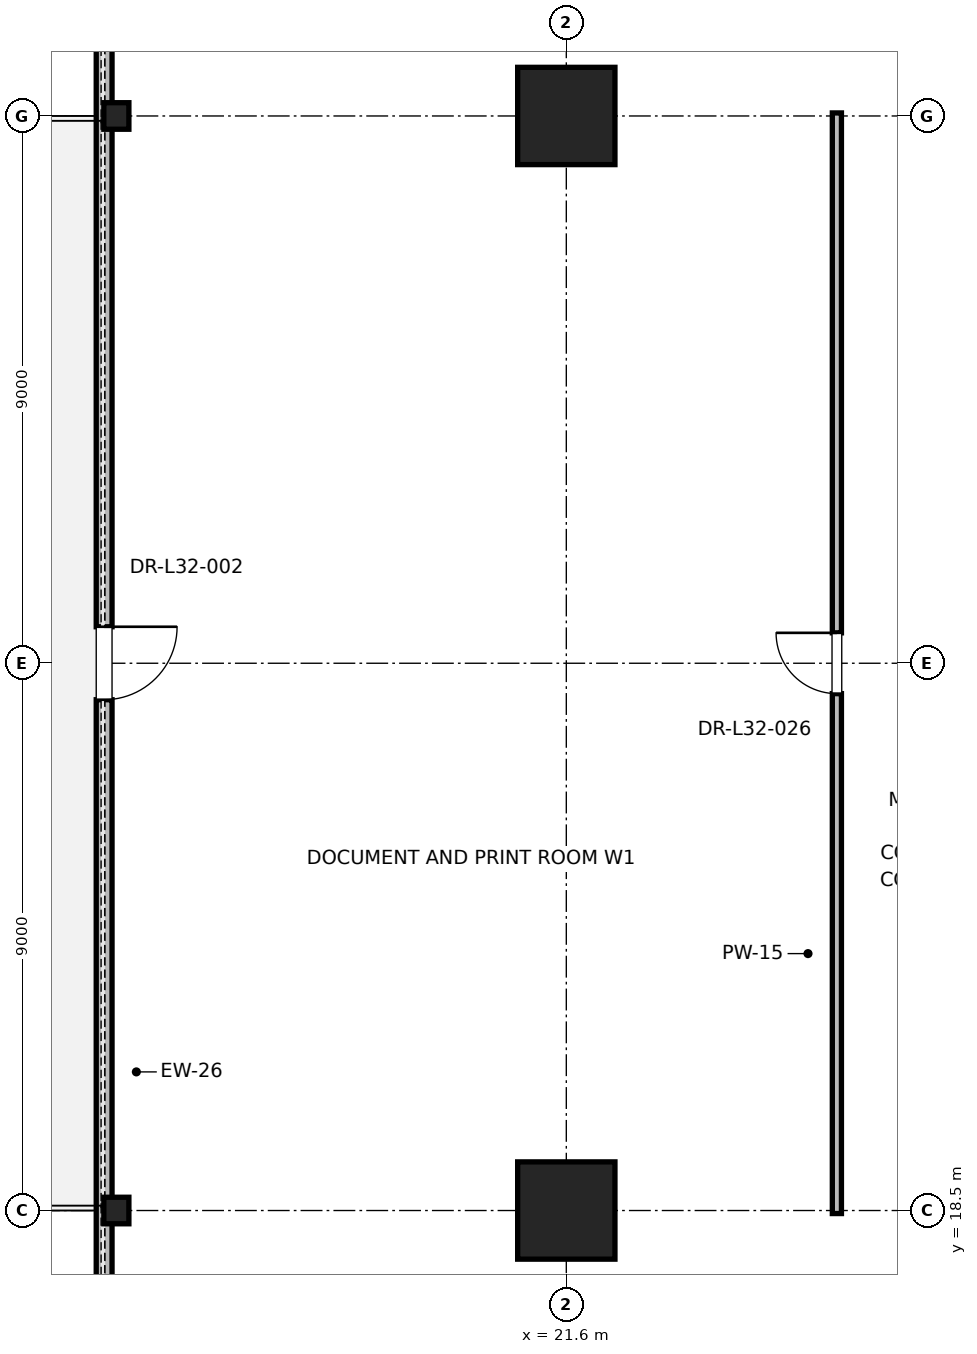
"""IFC4 building model, lengths in metres.
Left out: names, types, materials, properties, quantities, classifications, styles, units other than length and angle.
Written with IfcOpenShell. Run it as: python <this file> out.ifc"""

import sys

from ifc_helpers import new_model, si_unit, direction, frame, frame_2d, origin, origin_2d, place, context, subcontext, project, spatial, rectangle, i_section, extrude, element, fill, save


model = new_model("IFC4")
c1 = context("Model", 3, precision=1e-05, world=origin(), true_north=direction((0.0, 1.0)))
c2 = subcontext(c1, "Body", "Model", "MODEL_VIEW")
j1 = project(units=[si_unit("LENGTHUNIT", "METRE"), si_unit("PLANEANGLEUNIT", "RADIAN")], contexts=[c1])
p1 = place(None, origin())
s1 = spatial("IfcSite", under=j1, at=p1, CompositionType="ELEMENT")
p2 = place(p1, origin())
s2 = spatial("IfcBuilding", under=s1, at=p2, CompositionType="ELEMENT")
p3 = place(p2, frame((0.0, 0.0, 140.4)))
s3 = spatial("IfcBuildingStorey", under=s2, at=p3, CompositionType="ELEMENT", Elevation=140.4)
for number, where, z_axis, x_axis in (
    (1, (21.6, 18.5, 0.0), (0.0, 0.0, 1.0), (1.0, 0.0, 0.0)),
    (2, (21.6, 36.5, 0.0), (0.0, 0.0, 1.0), (1.0, 0.0, 0.0)),
):
    element("IfcColumn", number, at=place(p3, frame(where, z_axis=z_axis, x_axis=x_axis)), inside=s3, PredefinedType="COLUMN", context=c2, shape_type="SweptSolid", body=[
        extrude(rectangle(XDim=1.6, YDim=1.6, at=origin_2d()), origin(), (0.0, 0.0, 1.0), 4.0),
    ])
for number, where, z_axis, x_axis in (
    (3, (14.2, 18.5, 0.0), (0.0, 0.0, 1.0), (1.0, 0.0, 0.0)),
    (4, (14.2, 36.5, 0.0), (0.0, 0.0, 1.0), (1.0, 0.0, 0.0)),
):
    element("IfcColumn", number, at=place(p3, frame(where, z_axis=z_axis, x_axis=x_axis)), inside=s3, PredefinedType="COLUMN", context=c2, shape_type="SweptSolid", body=[
        extrude(i_section(OverallWidth=0.412, OverallDepth=0.437, WebThickness=0.036, FlangeThickness=0.058, FilletRadius=0.015, at=origin_2d()), origin(), (0.0, 0.0, 1.0), 4.0),
    ])
p4 = place(p3, frame((13.999, 46.541, 0.0), z_axis=(0.0, 0.0, 1.0), x_axis=(0.0, -1.0, 0.0)))
e5 = element("IfcWall", 5, at=p4, inside=s3, PredefinedType="PARAPET", context=c2, shape_type="SweptSolid", body=[
    extrude(rectangle(XDim=38.082, YDim=0.26, at=frame_2d((19.041, 0.0))), origin(), (0.0, 0.0, 1.0), 2.97),
])
p5 = place(p4, frame((4.2, 0.0, 0.85)))
e6 = element("IfcOpeningElement", 6, at=p5, cuts=e5, PredefinedType="OPENING", context=c2, shape_type="SweptSolid", body=[
    extrude(rectangle(XDim=2.0, YDim=2.3, at=frame_2d((1.0, 1.15))), frame((0.0, 0.13, 0.0), z_axis=(0.0, -1.0, 0.0), x_axis=(1.0, 0.0, 0.0)), (0.0, 0.0, 1.0), 0.26),
])
p6 = place(p4, frame((18.441, 0.0, 0.0)))
e7 = element("IfcOpeningElement", 7, at=p6, cuts=e5, PredefinedType="OPENING", context=c2, shape_type="SweptSolid", body=[
    extrude(rectangle(XDim=1.2, YDim=2.2, at=frame_2d((0.6, 1.1))), frame((0.0, 0.13, 0.0), z_axis=(0.0, -1.0, 0.0), x_axis=(1.0, 0.0, 0.0)), (0.0, 0.0, 1.0), 0.26),
])
p7 = place(p4, frame((31.882, 0.0, 0.85)))
e8 = element("IfcOpeningElement", 8, at=p7, cuts=e5, PredefinedType="OPENING", context=c2, shape_type="SweptSolid", body=[
    extrude(rectangle(XDim=2.0, YDim=2.3, at=frame_2d((1.0, 1.15))), frame((0.0, 0.13, 0.0), z_axis=(0.0, -1.0, 0.0), x_axis=(1.0, 0.0, 0.0)), (0.0, 0.0, 1.0), 0.26),
])
p8 = place(p3, frame((26.05, 18.45, 0.0), z_axis=(0.0, 0.0, 1.0), x_axis=(0.0, 1.0, 0.0)))
e9 = element("IfcWall", 9, at=p8, inside=s3, PredefinedType="PARTITIONING", context=c2, shape_type="SweptSolid", body=[
    extrude(rectangle(XDim=18.1, YDim=0.15, at=frame_2d((9.05, 0.0))), origin(), (0.0, 0.0, 1.0), 2.85),
])
p9 = place(p8, frame((8.55, 0.0, 0.0)))
e10 = element("IfcOpeningElement", 10, at=p9, cuts=e9, PredefinedType="OPENING", context=c2, shape_type="SweptSolid", body=[
    extrude(rectangle(XDim=1.0, YDim=2.15, at=frame_2d((0.5, 1.075))), frame((0.0, 0.075, 0.0), z_axis=(0.0, -1.0, 0.0), x_axis=(1.0, 0.0, 0.0)), (0.0, 0.0, 1.0), 0.15),
])
p10 = place(p6, origin())
e11 = element("IfcDoor", 11, at=p10, inside=s3, OperationType="SINGLE_SWING_LEFT", PredefinedType="DOOR", context=c2, shape_type="SweptSolid", body=[
    extrude(rectangle(XDim=1.2, YDim=2.2, at=frame_2d((0.6, 1.1))), frame((0.0, 0.025, 0.0), z_axis=(0.0, -1.0, 0.0), x_axis=(1.0, 0.0, 0.0)), (0.0, 0.0, 1.0), 0.05),
])
fill(e7, e11)
p11 = place(p9, origin())
e12 = element("IfcDoor", 12, at=p11, inside=s3, OperationType="SINGLE_SWING_RIGHT", PredefinedType="DOOR", context=c2, shape_type="SweptSolid", body=[
    extrude(rectangle(XDim=1.0, YDim=2.15, at=frame_2d((0.5, 1.075))), frame((0.0, 0.025, 0.0), z_axis=(0.0, -1.0, 0.0), x_axis=(1.0, 0.0, 0.0)), (0.0, 0.0, 1.0), 0.05),
])
fill(e10, e12)
save(model, sys.argv[1])
